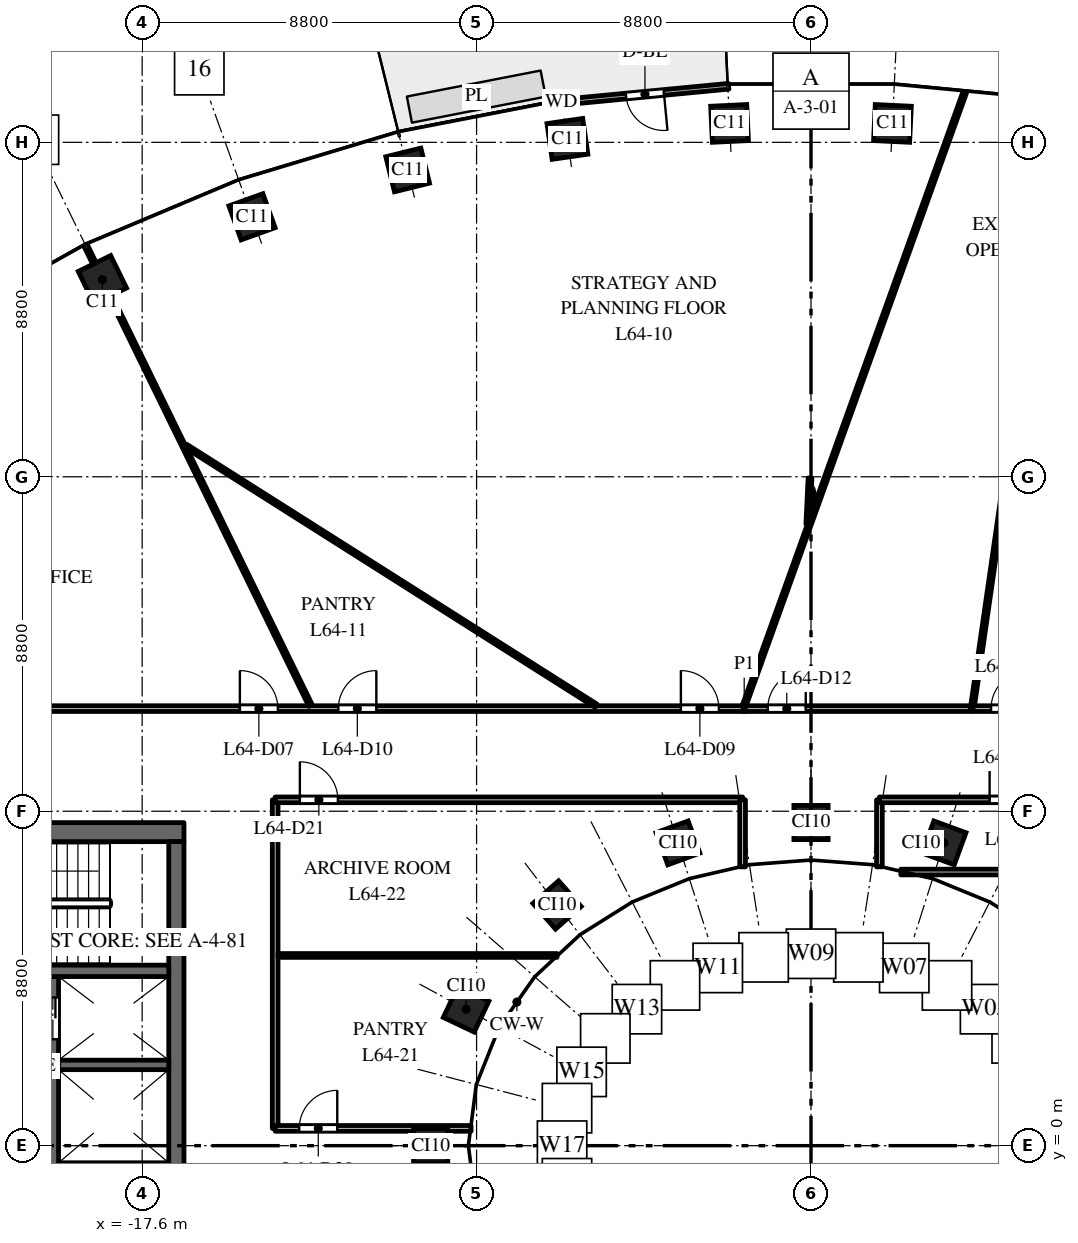
"""IFC4 building model, lengths in metres.
Left out: names, types, materials, properties, quantities, classifications, styles, units other than length and angle.
Written with IfcOpenShell. Run it as: python <this file> out.ifc"""

import sys

from ifc_helpers import new_model, si_unit, direction, frame, frame_2d, origin, origin_2d, place, context, subcontext, project, spatial, rectangle, extrude, element, fill, save


model = new_model("IFC4")
c1 = context("Model", 3, precision=1e-05, world=origin(), true_north=direction((0.0, 1.0)))
c2 = subcontext(c1, "Body", "Model", "MODEL_VIEW")
j1 = project(units=[si_unit("LENGTHUNIT", "METRE"), si_unit("PLANEANGLEUNIT", "RADIAN")], contexts=[c1])
p1 = place(None, origin())
s1 = spatial("IfcSite", under=j1, at=p1, CompositionType="ELEMENT")
p2 = place(p1, origin())
s2 = spatial("IfcBuilding", under=s1, at=p2, CompositionType="ELEMENT")
p3 = place(p2, frame((0.0, 0.0, 299.0)))
s3 = spatial("IfcBuildingStorey", under=s2, at=p3, CompositionType="ELEMENT", Elevation=299.0)
for number, where, z_axis, x_axis in (
    (1, (2.143, 26.898, 0.0), (0.0, 0.0, 1.0), (-0.999, 0.048, 0.0)),
    (2, (-2.143, 26.898, 0.0), (0.0, 0.0, 1.0), (-0.999, -0.048, 0.0)),
    (3, (-6.409, 26.491, 0.0), (0.0, 0.0, 1.0), (-0.99, -0.143, 0.0)),
    (4, (-10.613, 25.674, 0.0), (0.0, 0.0, 1.0), (-0.971, -0.24, 0.0)),
    (5, (-14.709, 24.441, 0.0), (0.0, 0.0, 1.0), (-0.941, -0.338, 0.0)),
    (6, (-18.646, 22.785, 0.0), (0.0, 0.0, 1.0), (-0.898, -0.439, 0.0)),
):
    element("IfcColumn", number, at=place(p3, frame(where, z_axis=z_axis, x_axis=x_axis)), inside=s3, PredefinedType="COLUMN", context=c2, shape_type="SweptSolid", body=[
        extrude(rectangle(XDim=0.95, YDim=0.95, at=origin_2d()), origin(), (0.0, 0.0, 1.0), 4.0),
    ])
for number, where, z_axis, x_axis in (
    (7, (3.501, 7.967, 0.0), (0.0, 0.0, 1.0), (-0.939, 0.344, 0.0)),
    (8, (0.0, 8.503, 0.0), (0.0, 0.0, 1.0), (-1.0, 0.0, 0.0)),
    (9, (-3.501, 7.967, 0.0), (0.0, 0.0, 1.0), (-0.939, -0.344, 0.0)),
    (10, (-6.682, 6.334, 0.0), (0.0, 0.0, 1.0), (-0.751, -0.66, 0.0)),
    (11, (-9.076, 3.588, 0.0), (0.0, 0.0, 1.0), (-0.429, -0.903, 0.0)),
    (12, (-10.008, 0.0, 0.0), (0.0, 0.0, 1.0), (0.0, -1.0, 0.0)),
):
    element("IfcColumn", number, at=place(p3, frame(where, z_axis=z_axis, x_axis=x_axis)), inside=s3, PredefinedType="COLUMN", context=c2, shape_type="SweptSolid", body=[
        extrude(rectangle(XDim=0.9, YDim=0.9, at=origin_2d()), origin(), (0.0, 0.0, 1.0), 4.0),
    ])
p4 = place(p3, frame((-16.5, 8.25, 0.0), z_axis=(0.0, 0.0, 1.0), x_axis=(-1.0, 0.0, 0.0)))
e13 = element("IfcWall", 13, at=p4, inside=s3, PredefinedType="SHEAR", context=c2, shape_type="SweptSolid", body=[
    extrude(rectangle(XDim=15.0, YDim=0.5, at=frame_2d((7.5, 0.0))), origin(), (0.0, 0.0, 1.0), 3.7),
])
p5 = place(p4, frame((6.9, 0.0, 0.0)))
e14 = element("IfcOpeningElement", 14, at=p5, cuts=e13, PredefinedType="OPENING", context=c2, shape_type="SweptSolid", body=[
    extrude(rectangle(XDim=1.2, YDim=2.1, at=frame_2d((0.6, 1.05))), frame((0.0, 0.26, 0.0), z_axis=(0.0, -1.0, 0.0), x_axis=(1.0, 0.0, 0.0)), (0.0, 0.0, 1.0), 0.52),
])
p6 = place(p4, frame((12.275, 0.0, 0.0)))
e15 = element("IfcOpeningElement", 15, at=p6, cuts=e13, PredefinedType="OPENING", context=c2, shape_type="SweptSolid", body=[
    extrude(rectangle(XDim=0.9, YDim=2.1, at=frame_2d((0.45, 1.05))), frame((0.0, 0.26, 0.0), z_axis=(0.0, -1.0, 0.0), x_axis=(1.0, 0.0, 0.0)), (0.0, 0.0, 1.0), 0.52),
])
p7 = place(p3, frame((-19.95, -4.45, 0.0), z_axis=(0.0, 0.0, 1.0), x_axis=(0.0, 1.0, 0.0)))
e16 = element("IfcWall", 16, at=p7, inside=s3, PredefinedType="SHEAR", context=c2, shape_type="SweptSolid", body=[
    extrude(rectangle(XDim=8.9, YDim=0.3, at=frame_2d((4.45, 0.0))), origin(), (0.0, 0.0, 1.0), 3.7),
])
p8 = place(p7, frame((0.775, 0.0, 0.0)))
e17 = element("IfcOpeningElement", 17, at=p8, cuts=e16, PredefinedType="OPENING", context=c2, shape_type="SweptSolid", body=[
    extrude(rectangle(XDim=1.2, YDim=2.1, at=frame_2d((0.6, 1.05))), frame((0.0, 0.16, 0.0), z_axis=(0.0, -1.0, 0.0), x_axis=(1.0, 0.0, 0.0)), (0.0, 0.0, 1.0), 0.32),
])
p9 = place(p7, frame((7.25, 0.0, 0.0)))
e18 = element("IfcOpeningElement", 18, at=p9, cuts=e16, PredefinedType="OPENING", context=c2, shape_type="SweptSolid", body=[
    extrude(rectangle(XDim=1.1, YDim=2.1, at=frame_2d((0.55, 1.05))), frame((0.0, 0.16, 0.0), z_axis=(0.0, -1.0, 0.0), x_axis=(1.0, 0.0, 0.0)), (0.0, 0.0, 1.0), 0.32),
])
p10 = place(p3, frame((-16.7, -8.0, 0.0), z_axis=(0.0, 0.0, 1.0), x_axis=(0.0, 1.0, 0.0)))
e19 = element("IfcWall", 19, at=p10, inside=s3, PredefinedType="SHEAR", context=c2, shape_type="SweptSolid", body=[
    extrude(rectangle(XDim=16.0, YDim=0.4, at=frame_2d((8.0, 0.0))), origin(), (0.0, 0.0, 1.0), 3.7),
])
p11 = place(p3, frame((-16.9, -1.075, 0.0), z_axis=(0.0, 0.0, 1.0), x_axis=(-1.0, 0.0, 0.0)))
e20 = element("IfcWall", 20, at=p11, inside=s3, PredefinedType="SHEAR", context=c2, shape_type="SweptSolid", body=[
    extrude(rectangle(XDim=2.9, YDim=1.25, at=frame_2d((1.45, 0.0))), origin(), (0.0, 0.0, 1.0), 3.7),
])
p12 = place(p3, frame((-16.9, 2.125, 0.0), z_axis=(0.0, 0.0, 1.0), x_axis=(-1.0, 0.0, 0.0)))
e21 = element("IfcWall", 21, at=p12, inside=s3, PredefinedType="SHEAR", context=c2, shape_type="SweptSolid", body=[
    extrude(rectangle(XDim=2.9, YDim=0.25, at=frame_2d((1.45, 0.0))), origin(), (0.0, 0.0, 1.0), 3.7),
])
p13 = place(p3, frame((-16.9, 4.6, 0.0), z_axis=(0.0, 0.0, 1.0), x_axis=(-1.0, 0.0, 0.0)))
e22 = element("IfcWall", 22, at=p13, inside=s3, PredefinedType="SHEAR", context=c2, shape_type="SweptSolid", body=[
    extrude(rectangle(XDim=6.18, YDim=0.3, at=frame_2d((3.09, 0.0))), origin(), (0.0, 0.0, 1.0), 3.7),
])
p14 = place(p13, frame((4.9, 0.0, 0.0)))
e23 = element("IfcOpeningElement", 23, at=p14, cuts=e22, PredefinedType="OPENING", context=c2, shape_type="SweptSolid", body=[
    extrude(rectangle(XDim=1.1, YDim=2.1, at=frame_2d((0.55, 1.05))), frame((0.0, 0.16, 0.0), z_axis=(0.0, -1.0, 0.0), x_axis=(1.0, 0.0, 0.0)), (0.0, 0.0, 1.0), 0.32),
])
p15 = place(p3, frame((-2.166, 27.875, 0.0), z_axis=(0.0, 0.0, 1.0), x_axis=(-0.995473879823, -0.095035543824, 0.0)))
e24 = element("IfcWall", 24, at=p15, inside=s3, PredefinedType="STANDARD", context=c2, shape_type="SweptSolid", body=[
    extrude(rectangle(XDim=4.426, YDim=0.15, at=frame_2d((2.213, 0.0))), origin(), (0.0, 0.0, 1.0), 3.7),
])
p16 = place(p15, frame((1.713, 0.0, 0.0)))
e25 = element("IfcOpeningElement", 25, at=p16, cuts=e24, PredefinedType="OPENING", context=c2, shape_type="SweptSolid", body=[
    extrude(rectangle(XDim=1.0, YDim=2.4, at=frame_2d((0.5, 1.2))), frame((0.0, 0.085, 0.0), z_axis=(0.0, -1.0, 0.0), x_axis=(1.0, 0.0, 0.0)), (0.0, 0.0, 1.0), 0.17),
])
p17 = place(p3, frame((-31.5, 11.5, 0.0), z_axis=(0.0, 0.0, 1.0), x_axis=(1.0, 0.0, 0.0)))
e26 = element("IfcWall", 26, at=p17, inside=s3, PredefinedType="PARTITIONING", context=c2, shape_type="SweptSolid", body=[
    extrude(rectangle(XDim=29.768, YDim=0.15, at=frame_2d((14.884, 0.0))), origin(), (0.0, 0.0, 1.0), 2.75),
])
p18 = place(p17, frame((4.249, 0.0, 0.0)))
e27 = element("IfcOpeningElement", 27, at=p18, cuts=e26, PredefinedType="OPENING", context=c2, shape_type="SweptSolid", body=[
    extrude(rectangle(XDim=1.0, YDim=2.1, at=frame_2d((0.5, 1.05))), frame((0.0, 0.085, 0.0), z_axis=(0.0, -1.0, 0.0), x_axis=(1.0, 0.0, 0.0)), (0.0, 0.0, 1.0), 0.17),
])
p19 = place(p17, frame((16.471, 0.0, 0.0)))
e28 = element("IfcOpeningElement", 28, at=p19, cuts=e26, PredefinedType="OPENING", context=c2, shape_type="SweptSolid", body=[
    extrude(rectangle(XDim=1.0, YDim=2.1, at=frame_2d((0.5, 1.05))), frame((0.0, 0.085, 0.0), z_axis=(0.0, -1.0, 0.0), x_axis=(1.0, 0.0, 0.0)), (0.0, 0.0, 1.0), 0.17),
])
p20 = place(p17, frame((28.076, 0.0, 0.0)))
e29 = element("IfcOpeningElement", 29, at=p20, cuts=e26, PredefinedType="OPENING", context=c2, shape_type="SweptSolid", body=[
    extrude(rectangle(XDim=1.0, YDim=2.1, at=frame_2d((0.5, 1.05))), frame((0.0, 0.085, 0.0), z_axis=(0.0, -1.0, 0.0), x_axis=(1.0, 0.0, 0.0)), (0.0, 0.0, 1.0), 0.17),
])
p21 = place(p17, frame((19.062, 0.0, 0.0)))
e30 = element("IfcOpeningElement", 30, at=p21, cuts=e26, PredefinedType="OPENING", context=c2, shape_type="SweptSolid", body=[
    extrude(rectangle(XDim=1.0, YDim=2.1, at=frame_2d((0.5, 1.05))), frame((0.0, 0.085, 0.0), z_axis=(0.0, -1.0, 0.0), x_axis=(1.0, 0.0, 0.0)), (0.0, 0.0, 1.0), 0.17),
])
p22 = place(p3, frame((-19.086, 23.685, 0.0), z_axis=(0.0, 0.0, 1.0), x_axis=(0.439180235984, -0.898398976135, 0.0)))
e31 = element("IfcWall", 31, at=p22, inside=s3, PredefinedType="PARTITIONING", context=c2, shape_type="SweptSolid", body=[
    extrude(rectangle(XDim=13.475, YDim=0.1, at=frame_2d((6.738, 0.0))), origin(), (0.0, 0.0, 1.0), 2.75),
])
p23 = place(p3, frame((-16.452, 18.412, 0.0), z_axis=(0.0, 0.0, 1.0), x_axis=(0.844827711376, -0.535038445434, 0.0)))
e32 = element("IfcWall", 32, at=p23, inside=s3, PredefinedType="PARTITIONING", context=c2, shape_type="SweptSolid", body=[
    extrude(rectangle(XDim=12.779, YDim=0.1, at=frame_2d((6.389, 0.0))), origin(), (0.0, 0.0, 1.0), 2.75),
])
p24 = place(p3, frame((-14.1, 0.455, 0.0), z_axis=(0.0, 0.0, 1.0), x_axis=(0.0, 1.0, 0.0)))
e33 = element("IfcWall", 33, at=p24, inside=s3, PredefinedType="PARTITIONING", context=c2, shape_type="SweptSolid", body=[
    extrude(rectangle(XDim=8.645, YDim=0.15, at=frame_2d((4.323, 0.0))), origin(), (0.0, 0.0, 1.0), 3.7),
])
p25 = place(p3, frame((-14.1, 0.455, 0.0), z_axis=(0.0, 0.0, 1.0), x_axis=(1.0, 0.0, 0.0)))
e34 = element("IfcWall", 34, at=p25, inside=s3, PredefinedType="PARTITIONING", context=c2, shape_type="SweptSolid", body=[
    extrude(rectangle(XDim=5.155, YDim=0.15, at=frame_2d((2.578, 0.0))), origin(), (0.0, 0.0, 1.0), 3.0),
])
p26 = place(p25, frame((0.634, 0.0, 0.0)))
e35 = element("IfcOpeningElement", 35, at=p26, cuts=e34, PredefinedType="OPENING", context=c2, shape_type="SweptSolid", body=[
    extrude(rectangle(XDim=1.0, YDim=2.1, at=frame_2d((0.5, 1.05))), frame((0.0, 0.085, 0.0), z_axis=(0.0, -1.0, 0.0), x_axis=(1.0, 0.0, 0.0)), (0.0, 0.0, 1.0), 0.17),
])
p27 = place(p3, frame((-14.025, 5.005, 0.0), z_axis=(0.0, 0.0, 1.0), x_axis=(1.0, 0.0, 0.0)))
e36 = element("IfcWall", 36, at=p27, inside=s3, PredefinedType="PARTITIONING", context=c2, shape_type="SweptSolid", body=[
    extrude(rectangle(XDim=7.341, YDim=0.1, at=frame_2d((3.67, 0.0))), origin(), (0.0, 0.0, 1.0), 3.0),
])
p28 = place(p3, frame((-14.1, 9.1, 0.0), z_axis=(0.0, 0.0, 1.0), x_axis=(1.0, 0.0, 0.0)))
e37 = element("IfcWall", 37, at=p28, inside=s3, PredefinedType="PARTITIONING", context=c2, shape_type="SweptSolid", body=[
    extrude(rectangle(XDim=12.3, YDim=0.15, at=frame_2d((6.15, 0.0))), origin(), (0.0, 0.0, 1.0), 2.75),
])
p29 = place(p28, frame((0.65, 0.0, 0.0)))
e38 = element("IfcOpeningElement", 38, at=p29, cuts=e37, PredefinedType="OPENING", context=c2, shape_type="SweptSolid", body=[
    extrude(rectangle(XDim=1.0, YDim=2.1, at=frame_2d((0.5, 1.05))), frame((0.0, 0.085, 0.0), z_axis=(0.0, -1.0, 0.0), x_axis=(1.0, 0.0, 0.0)), (0.0, 0.0, 1.0), 0.17),
])
p30 = place(p3, frame((-1.8, 7.336, 0.0), z_axis=(0.0, 0.0, 1.0), x_axis=(0.0, 1.0, 0.0)))
e39 = element("IfcWall", 39, at=p30, inside=s3, PredefinedType="PARTITIONING", context=c2, shape_type="SweptSolid", body=[
    extrude(rectangle(XDim=1.764, YDim=0.15, at=frame_2d((0.882, 0.0))), origin(), (0.0, 0.0, 1.0), 3.0),
])
p31 = place(p3, frame((-1.758, 11.579, 0.0), z_axis=(0.0, 0.0, 1.0), x_axis=(0.338425059236, 0.940993347097, 0.0)))
e40 = element("IfcWall", 40, at=p31, inside=s3, PredefinedType="PARTITIONING", context=c2, shape_type="SweptSolid", body=[
    extrude(rectangle(XDim=17.15, YDim=0.1, at=frame_2d((8.575, 0.0))), origin(), (0.0, 0.0, 1.0), 2.85),
])
p32 = place(p3, frame((-1.774, 11.5, 0.0), z_axis=(0.0, 0.0, 1.0), x_axis=(1.0, 0.0, 0.0)))
e41 = element("IfcWall", 41, at=p32, inside=s3, PredefinedType="PARTITIONING", context=c2, shape_type="SweptSolid", body=[
    extrude(rectangle(XDim=6.016, YDim=0.15, at=frame_2d((3.008, 0.0))), origin(), (0.0, 0.0, 1.0), 2.85),
])
p33 = place(p32, frame((0.636, 0.0, 0.0)))
e42 = element("IfcOpeningElement", 42, at=p33, cuts=e41, PredefinedType="OPENING", context=c2, shape_type="SweptSolid", body=[
    extrude(rectangle(XDim=1.0, YDim=2.1, at=frame_2d((0.5, 1.05))), frame((0.0, 0.085, 0.0), z_axis=(0.0, -1.0, 0.0), x_axis=(1.0, 0.0, 0.0)), (0.0, 0.0, 1.0), 0.17),
])
p34 = place(p3, frame((-0.084, 16.356, 0.0), z_axis=(0.0, 0.0, 1.0), x_axis=(0.047967320325, 0.998848905581, 0.0)))
e43 = element("IfcWall", 43, at=p34, inside=s3, PredefinedType="PARTITIONING", context=c2, shape_type="SweptSolid", body=[
    extrude(rectangle(XDim=1.211, YDim=0.1, at=frame_2d((0.606, 0.0))), origin(), (0.0, 0.0, 1.0), 3.7),
])
p35 = place(p3, frame((0.002, 17.284, 0.0), z_axis=(0.0, 0.0, 1.0), x_axis=(0.240121592304, -0.970742819139, 0.0)))
e44 = element("IfcWall", 44, at=p35, inside=s3, PredefinedType="PARTITIONING", context=c2, shape_type="SweptSolid", body=[
    extrude(rectangle(XDim=0.405, YDim=0.1, at=frame_2d((0.202, 0.0))), origin(), (0.0, 0.0, 1.0), 3.7),
])
p36 = place(p3, frame((1.8, 7.336, 0.0), z_axis=(0.0, 0.0, 1.0), x_axis=(0.0, 1.0, 0.0)))
e45 = element("IfcWall", 45, at=p36, inside=s3, PredefinedType="PARTITIONING", context=c2, shape_type="SweptSolid", body=[
    extrude(rectangle(XDim=1.764, YDim=0.15, at=frame_2d((0.882, 0.0))), origin(), (0.0, 0.0, 1.0), 3.0),
])
p37 = place(p3, frame((1.8, 9.1, 0.0), z_axis=(0.0, 0.0, 1.0), x_axis=(1.0, 0.0, 0.0)))
e46 = element("IfcWall", 46, at=p37, inside=s3, PredefinedType="PARTITIONING", context=c2, shape_type="SweptSolid", body=[
    extrude(rectangle(XDim=12.3, YDim=0.15, at=frame_2d((6.15, 0.0))), origin(), (0.0, 0.0, 1.0), 2.85),
])
p38 = place(p37, frame((2.9, 0.0, 0.0)))
e47 = element("IfcOpeningElement", 47, at=p38, cuts=e46, PredefinedType="OPENING", context=c2, shape_type="SweptSolid", body=[
    extrude(rectangle(XDim=1.0, YDim=2.1, at=frame_2d((0.5, 1.05))), frame((0.0, 0.085, 0.0), z_axis=(0.0, -1.0, 0.0), x_axis=(1.0, 0.0, 0.0)), (0.0, 0.0, 1.0), 0.17),
])
p39 = place(p3, frame((2.364, 7.2, 0.0), z_axis=(0.0, 0.0, 1.0), x_axis=(1.0, 0.0, 0.0)))
e48 = element("IfcWall", 48, at=p39, inside=s3, PredefinedType="PARTITIONING", context=c2, shape_type="SweptSolid", body=[
    extrude(rectangle(XDim=11.661, YDim=0.15, at=frame_2d((5.831, 0.0))), origin(), (0.0, 0.0, 1.0), 2.75),
])
p40 = place(p39, frame((6.204, 0.0, 0.0)))
e49 = element("IfcOpeningElement", 49, at=p40, cuts=e48, PredefinedType="OPENING", context=c2, shape_type="SweptSolid", body=[
    extrude(rectangle(XDim=1.0, YDim=2.1, at=frame_2d((0.5, 1.05))), frame((0.0, 0.085, 0.0), z_axis=(0.0, -1.0, 0.0), x_axis=(1.0, 0.0, 0.0)), (0.0, 0.0, 1.0), 0.17),
])
p41 = place(p39, frame((8.308, 0.0, 0.0)))
e50 = element("IfcOpeningElement", 50, at=p41, cuts=e48, PredefinedType="OPENING", context=c2, shape_type="SweptSolid", body=[
    extrude(rectangle(XDim=1.0, YDim=2.1, at=frame_2d((0.5, 1.05))), frame((0.0, 0.085, 0.0), z_axis=(0.0, -1.0, 0.0), x_axis=(1.0, 0.0, 0.0)), (0.0, 0.0, 1.0), 0.17),
])
p42 = place(p39, frame((10.222, 0.0, 0.0)))
e51 = element("IfcOpeningElement", 51, at=p42, cuts=e48, PredefinedType="OPENING", context=c2, shape_type="SweptSolid", body=[
    extrude(rectangle(XDim=1.0, YDim=2.1, at=frame_2d((0.5, 1.05))), frame((0.0, 0.085, 0.0), z_axis=(0.0, -1.0, 0.0), x_axis=(1.0, 0.0, 0.0)), (0.0, 0.0, 1.0), 0.17),
])
p43 = place(p3, frame((4.242, 11.5, 0.0), z_axis=(0.0, 0.0, 1.0), x_axis=(0.1429940435, 0.98972354904, 0.0)))
e52 = element("IfcWall", 52, at=p43, inside=s3, PredefinedType="PARTITIONING", context=c2, shape_type="SweptSolid", body=[
    extrude(rectangle(XDim=7.106, YDim=0.1, at=frame_2d((3.553, 0.0))), origin(), (0.0, 0.0, 1.0), 3.7),
])
p44 = place(p3, frame((4.262, 11.5, 0.0), z_axis=(0.0, 0.0, 1.0), x_axis=(1.0, 0.0, 0.0)))
e53 = element("IfcWall", 53, at=p44, inside=s3, PredefinedType="PARTITIONING", context=c2, shape_type="SweptSolid", body=[
    extrude(rectangle(XDim=27.238, YDim=0.15, at=frame_2d((13.619, 0.0))), origin(), (0.0, 0.0, 1.0), 2.75),
])
p45 = place(p44, frame((0.476, 0.0, 0.0)))
e54 = element("IfcOpeningElement", 54, at=p45, cuts=e53, PredefinedType="OPENING", context=c2, shape_type="SweptSolid", body=[
    extrude(rectangle(XDim=1.0, YDim=2.1, at=frame_2d((0.5, 1.05))), frame((0.0, 0.085, 0.0), z_axis=(0.0, -1.0, 0.0), x_axis=(1.0, 0.0, 0.0)), (0.0, 0.0, 1.0), 0.17),
])
p46 = place(p44, frame((9.588, 0.0, 0.0)))
e55 = element("IfcOpeningElement", 55, at=p46, cuts=e53, PredefinedType="OPENING", context=c2, shape_type="SweptSolid", body=[
    extrude(rectangle(XDim=1.0, YDim=2.1, at=frame_2d((0.5, 1.05))), frame((0.0, 0.085, 0.0), z_axis=(0.0, -1.0, 0.0), x_axis=(1.0, 0.0, 0.0)), (0.0, 0.0, 1.0), 0.17),
])
p47 = place(p9, origin())
e56 = element("IfcDoor", 56, at=p47, inside=s3, OperationType="DOUBLE_DOOR_SLIDING", PredefinedType="DOOR", context=c2, shape_type="SweptSolid", body=[
    extrude(rectangle(XDim=1.1, YDim=2.1, at=frame_2d((0.55, 1.05))), frame((0.0, 0.025, 0.0), z_axis=(0.0, -1.0, 0.0), x_axis=(1.0, 0.0, 0.0)), (0.0, 0.0, 1.0), 0.05),
])
fill(e18, e56)
p48 = place(p16, origin())
e57 = element("IfcDoor", 57, at=p48, inside=s3, OperationType="SINGLE_SWING_LEFT", PredefinedType="DOOR", context=c2, shape_type="SweptSolid", body=[
    extrude(rectangle(XDim=1.0, YDim=2.4, at=frame_2d((0.5, 1.2))), frame((0.0, 0.025, 0.0), z_axis=(0.0, -1.0, 0.0), x_axis=(1.0, 0.0, 0.0)), (0.0, 0.0, 1.0), 0.05),
])
fill(e25, e57)
p49 = place(p38, origin())
e58 = element("IfcDoor", 58, at=p49, inside=s3, OperationType="SINGLE_SWING_LEFT", PredefinedType="DOOR", context=c2, shape_type="SweptSolid", body=[
    extrude(rectangle(XDim=1.0, YDim=2.1, at=frame_2d((0.5, 1.05))), frame((0.0, 0.025, 0.0), z_axis=(0.0, -1.0, 0.0), x_axis=(1.0, 0.0, 0.0)), (0.0, 0.0, 1.0), 0.05),
])
fill(e47, e58)
p50 = place(p19, origin())
e59 = element("IfcDoor", 59, at=p50, inside=s3, OperationType="SINGLE_SWING_LEFT", PredefinedType="DOOR", context=c2, shape_type="SweptSolid", body=[
    extrude(rectangle(XDim=1.0, YDim=2.1, at=frame_2d((0.5, 1.05))), frame((0.0, 0.025, 0.0), z_axis=(0.0, -1.0, 0.0), x_axis=(1.0, 0.0, 0.0)), (0.0, 0.0, 1.0), 0.05),
])
fill(e28, e59)
p51 = place(p20, origin())
e60 = element("IfcDoor", 60, at=p51, inside=s3, OperationType="SINGLE_SWING_LEFT", PredefinedType="DOOR", context=c2, shape_type="SweptSolid", body=[
    extrude(rectangle(XDim=1.0, YDim=2.1, at=frame_2d((0.5, 1.05))), frame((0.0, 0.025, 0.0), z_axis=(0.0, -1.0, 0.0), x_axis=(1.0, 0.0, 0.0)), (0.0, 0.0, 1.0), 0.05),
])
fill(e29, e60)
p52 = place(p21, origin())
e61 = element("IfcDoor", 61, at=p52, inside=s3, OperationType="SINGLE_SWING_RIGHT", PredefinedType="DOOR", context=c2, shape_type="SweptSolid", body=[
    extrude(rectangle(XDim=1.0, YDim=2.1, at=frame_2d((0.5, 1.05))), frame((0.0, 0.025, 0.0), z_axis=(0.0, -1.0, 0.0), x_axis=(1.0, 0.0, 0.0)), (0.0, 0.0, 1.0), 0.05),
])
fill(e30, e61)
p53 = place(p33, origin())
e62 = element("IfcDoor", 62, at=p53, inside=s3, OperationType="SINGLE_SWING_RIGHT", PredefinedType="DOOR", context=c2, shape_type="SweptSolid", body=[
    extrude(rectangle(XDim=1.0, YDim=2.1, at=frame_2d((0.5, 1.05))), frame((0.0, 0.025, 0.0), z_axis=(0.0, -1.0, 0.0), x_axis=(1.0, 0.0, 0.0)), (0.0, 0.0, 1.0), 0.05),
])
fill(e42, e62)
p54 = place(p45, origin())
e63 = element("IfcDoor", 63, at=p54, inside=s3, OperationType="SINGLE_SWING_RIGHT", PredefinedType="DOOR", context=c2, shape_type="SweptSolid", body=[
    extrude(rectangle(XDim=1.0, YDim=2.1, at=frame_2d((0.5, 1.05))), frame((0.0, 0.025, 0.0), z_axis=(0.0, -1.0, 0.0), x_axis=(1.0, 0.0, 0.0)), (0.0, 0.0, 1.0), 0.05),
])
fill(e54, e63)
p55 = place(p26, origin())
e64 = element("IfcDoor", 64, at=p55, inside=s3, OperationType="SINGLE_SWING_RIGHT", PredefinedType="DOOR", context=c2, shape_type="SweptSolid", body=[
    extrude(rectangle(XDim=1.0, YDim=2.1, at=frame_2d((0.5, 1.05))), frame((0.0, 0.025, 0.0), z_axis=(0.0, -1.0, 0.0), x_axis=(1.0, 0.0, 0.0)), (0.0, 0.0, 1.0), 0.05),
])
fill(e35, e64)
p56 = place(p29, origin())
e65 = element("IfcDoor", 65, at=p56, inside=s3, OperationType="SINGLE_SWING_LEFT", PredefinedType="DOOR", context=c2, shape_type="SweptSolid", body=[
    extrude(rectangle(XDim=1.0, YDim=2.1, at=frame_2d((0.5, 1.05))), frame((0.0, 0.025, 0.0), z_axis=(0.0, -1.0, 0.0), x_axis=(1.0, 0.0, 0.0)), (0.0, 0.0, 1.0), 0.05),
])
fill(e38, e65)
save(model, sys.argv[1])
